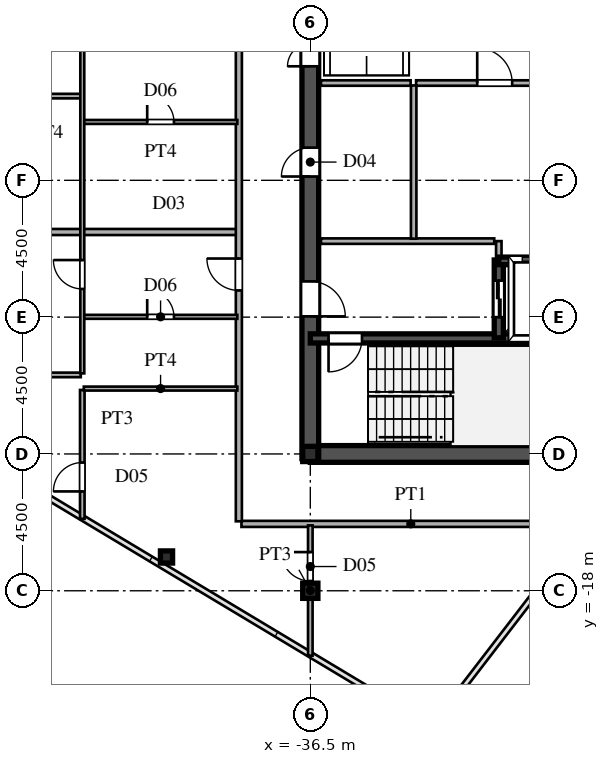
"""IFC4 building model, lengths in metres.
Left out: names, types, materials, properties, quantities, classifications, styles, units other than length and angle.
Written with IfcOpenShell. Run it as: python <this file> out.ifc"""

import sys

from ifc_helpers import new_model, si_unit, direction, frame, frame_2d, origin, origin_2d, place, context, subcontext, project, spatial, rectangle, hollow_rectangle, i_section, extrude, source, transform, mapped, element, fill, save


model = new_model("IFC4")
c1 = context("Model", 3, precision=1e-05, world=origin(), true_north=direction((0.0, 1.0)))
c2 = subcontext(c1, "Body", "Model", "MODEL_VIEW")
j1 = project(units=[si_unit("LENGTHUNIT", "METRE"), si_unit("PLANEANGLEUNIT", "RADIAN")], contexts=[c1])
p1 = place(None, origin())
s1 = spatial("IfcSite", under=j1, at=p1, CompositionType="ELEMENT")
p2 = place(p1, origin())
s2 = spatial("IfcBuilding", under=s1, at=p2, CompositionType="ELEMENT")
p3 = place(p2, frame((0.0, 0.0, 199.5)))
s3 = spatial("IfcBuildingStorey", under=s2, at=p3, CompositionType="ELEMENT", Elevation=199.5)
m1 = source(origin(), c2, "Body", "SweptSolid", [
    extrude(i_section(OverallWidth=0.5, OverallDepth=0.5, WebThickness=0.02, FlangeThickness=0.032, at=origin_2d()), origin(), (0.0, 0.0, 1.0), 3.6),
])
for number, where, z_axis, x_axis in (
    (1, (-36.5, -18.0, 0.0), (0.0, 0.0, 1.0), (1.0, 0.0, 0.0)),
    (2, (-36.5, -13.5, 0.0), (0.0, 0.0, 1.0), (1.0, 0.0, 0.0)),
):
    element("IfcColumn", number, at=place(p3, frame(where, z_axis=z_axis, x_axis=x_axis)), inside=s3, PredefinedType="COLUMN", context=c2, shape_type="MappedRepresentation", body=[
        mapped(m1, transform((0.0, 0.0, 0.0), scale=1.0)),
    ])
m2 = source(origin(), c2, "Body", "SweptSolid", [
    extrude(hollow_rectangle(XDim=0.4, YDim=0.4, WallThickness=0.016, at=origin_2d()), origin(), (0.0, 0.0, 1.0), 3.6),
])
p4 = place(p3, frame((-41.23, -16.889, 0.0), z_axis=(0.0, 0.0, 1.0), x_axis=(1.0, 0.0, 0.0)))
e3 = element("IfcColumn", 3, at=p4, inside=s3, PredefinedType="COLUMN", context=c2, shape_type="MappedRepresentation", body=[
    mapped(m2, transform((0.0, 0.0, 0.0), scale=1.0)),
])
p5 = place(p3, frame((-36.5, -13.5, 0.0), z_axis=(0.0, 0.0, 1.0), x_axis=(1.0, 0.0, 0.0)))
e4 = element("IfcWall", 4, at=p5, inside=s3, PredefinedType="SHEAR", context=c2, shape_type="SweptSolid", body=[
    extrude(rectangle(XDim=9.0, YDim=0.55, at=frame_2d((4.5, 0.0))), origin(), (0.0, 0.0, 1.0), 3.38),
])
p6 = place(p3, frame((-36.5, -13.65, 0.0), z_axis=(0.0, 0.0, 1.0), x_axis=(0.0, 1.0, 0.0)))
e5 = element("IfcWall", 5, at=p6, inside=s3, PredefinedType="SHEAR", context=c2, shape_type="SweptSolid", body=[
    extrude(rectangle(XDim=7.15, YDim=0.55, at=frame_2d((3.575, 0.0))), origin(), (0.0, 0.0, 1.0), 3.38),
])
p7 = place(p6, frame((4.675, 0.0, 0.0)))
e6 = element("IfcOpeningElement", 6, at=p7, cuts=e5, PredefinedType="OPENING", context=c2, shape_type="SweptSolid", body=[
    extrude(rectangle(XDim=1.15, YDim=2.2, at=frame_2d((0.575, 1.1))), frame((0.0, 0.285, 0.0), z_axis=(0.0, -1.0, 0.0), x_axis=(1.0, 0.0, 0.0)), (0.0, 0.0, 1.0), 0.57),
])
p8 = place(p3, frame((-36.5, -1.3, 0.0), z_axis=(0.0, 0.0, 1.0), x_axis=(0.0, 1.0, 0.0)))
e7 = element("IfcWall", 7, at=p8, inside=s3, PredefinedType="SHEAR", context=c2, shape_type="SweptSolid", body=[
    extrude(rectangle(XDim=2.6, YDim=0.55, at=frame_2d((1.3, 0.0))), origin(), (0.0, 0.0, 1.0), 3.38),
])
p9 = place(p8, frame((0.55, 0.0, 0.0)))
e8 = element("IfcOpeningElement", 8, at=p9, cuts=e7, PredefinedType="OPENING", context=c2, shape_type="SweptSolid", body=[
    extrude(rectangle(XDim=1.5, YDim=2.3, at=frame_2d((0.75, 1.15))), frame((0.0, 0.285, 0.0), z_axis=(0.0, -1.0, 0.0), x_axis=(1.0, 0.0, 0.0)), (0.0, 0.0, 1.0), 0.57),
])
p10 = place(p3, frame((-36.5, -6.5, 0.0), z_axis=(0.0, 0.0, 1.0), x_axis=(0.0, 1.0, 0.0)))
e9 = element("IfcWall", 9, at=p10, inside=s3, PredefinedType="SHEAR", context=c2, shape_type="SweptSolid", body=[
    extrude(rectangle(XDim=5.2, YDim=0.55, at=frame_2d((2.6, 0.0))), origin(), (0.0, 0.0, 1.0), 3.38),
])
p11 = place(p10, frame((2.125, 0.0, 0.0)))
e10 = element("IfcOpeningElement", 10, at=p11, cuts=e9, PredefinedType="OPENING", context=c2, shape_type="SweptSolid", body=[
    extrude(rectangle(XDim=0.95, YDim=2.15, at=frame_2d((0.475, 1.075))), frame((0.0, 0.285, 0.0), z_axis=(0.0, -1.0, 0.0), x_axis=(1.0, 0.0, 0.0)), (0.0, 0.0, 1.0), 0.57),
])
p12 = place(p3, frame((-36.5, -9.7, 0.0), z_axis=(0.0, 0.0, 1.0), x_axis=(1.0, 0.0, 0.0)))
e11 = element("IfcWall", 11, at=p12, inside=s3, PredefinedType="SHEAR", context=c2, shape_type="SweptSolid", body=[
    extrude(rectangle(XDim=9.0, YDim=0.3, at=frame_2d((4.5, 0.0))), origin(), (0.0, 0.0, 1.0), 3.38),
])
p13 = place(p12, frame((0.6, 0.0, 0.0)))
e12 = element("IfcOpeningElement", 12, at=p13, cuts=e11, PredefinedType="OPENING", context=c2, shape_type="SweptSolid", body=[
    extrude(rectangle(XDim=1.1, YDim=2.2, at=frame_2d((0.55, 1.1))), frame((0.0, 0.16, 0.0), z_axis=(0.0, -1.0, 0.0), x_axis=(1.0, 0.0, 0.0)), (0.0, 0.0, 1.0), 0.32),
])
p14 = place(p3, frame((-30.3, -7.15, 0.0), z_axis=(0.0, 0.0, 1.0), x_axis=(1.0, 0.0, 0.0)))
e13 = element("IfcWall", 13, at=p14, inside=s3, PredefinedType="SHEAR", context=c2, shape_type="SweptSolid", body=[
    extrude(rectangle(XDim=2.8, YDim=0.25, at=frame_2d((1.4, 0.0))), origin(), (0.0, 0.0, 1.0), 3.38),
])
p15 = place(p3, frame((-30.3, -9.68, 0.0), z_axis=(0.0, 0.0, 1.0), x_axis=(0.0, 1.0, 0.0)))
e14 = element("IfcWall", 14, at=p15, inside=s3, PredefinedType="SHEAR", context=c2, shape_type="SweptSolid", body=[
    extrude(rectangle(XDim=2.56, YDim=0.3, at=frame_2d((1.28, 0.0))), origin(), (0.0, 0.0, 1.0), 3.38),
])
p16 = place(p15, frame((0.68, 0.0, 0.0)))
e15 = element("IfcOpeningElement", 15, at=p16, cuts=e14, PredefinedType="OPENING", context=c2, shape_type="SweptSolid", body=[
    extrude(rectangle(XDim=1.2, YDim=2.25, at=frame_2d((0.6, 1.125))), frame((0.0, 0.16, 0.0), z_axis=(0.0, -1.0, 0.0), x_axis=(1.0, 0.0, 0.0)), (0.0, 0.0, 1.0), 0.32),
])
p17 = place(p3, frame((-36.15, -6.5, 0.0), z_axis=(0.0, 0.0, 1.0), x_axis=(1.0, 0.0, 0.0)))
e16 = element("IfcWall", 16, at=p17, inside=s3, PredefinedType="PARTITIONING", context=c2, shape_type="SweptSolid", body=[
    extrude(rectangle(XDim=5.7, YDim=0.18, at=frame_2d((2.85, 0.0))), origin(), (0.0, 0.0, 1.0), 3.38),
])
p18 = place(p3, frame((-30.3, -7.12, 0.0), z_axis=(0.0, 0.0, 1.0), x_axis=(0.0, 1.0, 0.0)))
e17 = element("IfcWall", 17, at=p18, inside=s3, PredefinedType="PARTITIONING", context=c2, shape_type="SweptSolid", body=[
    extrude(rectangle(XDim=0.62, YDim=0.18, at=frame_2d((0.31, 0.0))), origin(), (0.0, 0.0, 1.0), 3.38),
])
p19 = place(p3, frame((-33.1, -6.42, 0.0), z_axis=(0.0, 0.0, 1.0), x_axis=(0.0, 1.0, 0.0)))
e18 = element("IfcWall", 18, at=p19, inside=s3, PredefinedType="PARTITIONING", context=c2, shape_type="SweptSolid", body=[
    extrude(rectangle(XDim=5.04, YDim=0.18, at=frame_2d((2.52, 0.0))), origin(), (0.0, 0.0, 1.0), 3.38),
])
p20 = place(p3, frame((-33.02, -1.3, 0.0), z_axis=(0.0, 0.0, 1.0), x_axis=(1.0, 0.0, 0.0)))
e19 = element("IfcWall", 19, at=p20, inside=s3, PredefinedType="PARTITIONING", context=c2, shape_type="SweptSolid", body=[
    extrude(rectangle(XDim=5.17, YDim=0.18, at=frame_2d((2.585, 0.0))), origin(), (0.0, 0.0, 1.0), 3.38),
])
p21 = place(p20, frame((2.01, 0.0, 0.0)))
e20 = element("IfcOpeningElement", 20, at=p21, cuts=e19, PredefinedType="OPENING", context=c2, shape_type="SweptSolid", body=[
    extrude(rectangle(XDim=1.15, YDim=2.2, at=frame_2d((0.575, 1.1))), frame((0.0, 0.1, 0.0), z_axis=(0.0, -1.0, 0.0), x_axis=(1.0, 0.0, 0.0)), (0.0, 0.0, 1.0), 0.2),
])
p22 = place(p3, frame((-36.15, -1.3, 0.0), z_axis=(0.0, 0.0, 1.0), x_axis=(1.0, 0.0, 0.0)))
e21 = element("IfcWall", 21, at=p22, inside=s3, PredefinedType="PARTITIONING", context=c2, shape_type="SweptSolid", body=[
    extrude(rectangle(XDim=2.95, YDim=0.18, at=frame_2d((1.475, 0.0))), origin(), (0.0, 0.0, 1.0), 3.38),
])
p23 = place(p3, frame((-38.765, -15.8, 0.0), z_axis=(0.0, 0.0, 1.0), x_axis=(1.0, 0.0, 0.0)))
e22 = element("IfcWall", 22, at=p23, inside=s3, PredefinedType="PARTITIONING", context=c2, shape_type="SweptSolid", body=[
    extrude(rectangle(XDim=11.14, YDim=0.2, at=frame_2d((5.57, 0.0))), origin(), (0.0, 0.0, 1.0), 3.38),
])
p24 = place(p3, frame((-43.95, -11.35, 0.0), z_axis=(0.0, 0.0, 1.0), x_axis=(1.0, 0.0, 0.0)))
e23 = element("IfcWall", 23, at=p24, inside=s3, PredefinedType="PARTITIONING", context=c2, shape_type="SweptSolid", body=[
    extrude(rectangle(XDim=5.05, YDim=0.13, at=frame_2d((2.525, 0.0))), origin(), (0.0, 0.0, 1.0), 3.38),
])
p25 = place(p3, frame((-51.868, -10.9, 0.0), z_axis=(0.0, 0.0, 1.0), x_axis=(1.0, 0.0, 0.0)))
e24 = element("IfcWall", 24, at=p25, inside=s3, PredefinedType="PARTITIONING", context=c2, shape_type="SweptSolid", body=[
    extrude(rectangle(XDim=7.818, YDim=0.15, at=frame_2d((3.909, 0.0))), origin(), (0.0, 0.0, 1.0), 3.38),
])
p26 = place(p25, frame((3.476, 0.0, 0.0)))
e25 = element("IfcOpeningElement", 25, at=p26, cuts=e24, PredefinedType="OPENING", context=c2, shape_type="SweptSolid", body=[
    extrude(rectangle(XDim=0.95, YDim=2.15, at=frame_2d((0.475, 1.075))), frame((0.0, 0.085, 0.0), z_axis=(0.0, -1.0, 0.0), x_axis=(1.0, 0.0, 0.0)), (0.0, 0.0, 1.0), 0.17),
])
p27 = place(p3, frame((-43.95, -8.99, 0.0), z_axis=(0.0, 0.0, 1.0), x_axis=(1.0, 0.0, 0.0)))
e26 = element("IfcWall", 26, at=p27, inside=s3, PredefinedType="PARTITIONING", context=c2, shape_type="SweptSolid", body=[
    extrude(rectangle(XDim=5.05, YDim=0.13, at=frame_2d((2.525, 0.0))), origin(), (0.0, 0.0, 1.0), 3.38),
])
p28 = place(p27, frame((2.085, 0.0, 0.0)))
e27 = element("IfcOpeningElement", 27, at=p28, cuts=e26, PredefinedType="OPENING", context=c2, shape_type="SweptSolid", body=[
    extrude(rectangle(XDim=0.88, YDim=2.1, at=frame_2d((0.44, 1.05))), frame((0.0, 0.075, 0.0), z_axis=(0.0, -1.0, 0.0), x_axis=(1.0, 0.0, 0.0)), (0.0, 0.0, 1.0), 0.15),
])
p29 = place(p3, frame((-59.676, -6.2, 0.0), z_axis=(0.0, 0.0, 1.0), x_axis=(1.0, 0.0, 0.0)))
e28 = element("IfcWall", 28, at=p29, inside=s3, PredefinedType="PARTITIONING", context=c2, shape_type="SweptSolid", body=[
    extrude(rectangle(XDim=20.746, YDim=0.2, at=frame_2d((10.373, 0.0))), origin(), (0.0, 0.0, 1.0), 3.38),
])
p30 = place(p3, frame((-43.95, -2.58, 0.0), z_axis=(0.0, 0.0, 1.0), x_axis=(1.0, 0.0, 0.0)))
e29 = element("IfcWall", 29, at=p30, inside=s3, PredefinedType="PARTITIONING", context=c2, shape_type="SweptSolid", body=[
    extrude(rectangle(XDim=5.05, YDim=0.13, at=frame_2d((2.525, 0.0))), origin(), (0.0, 0.0, 1.0), 3.38),
])
p31 = place(p30, frame((2.085, 0.0, 0.0)))
e30 = element("IfcOpeningElement", 30, at=p31, cuts=e29, PredefinedType="OPENING", context=c2, shape_type="SweptSolid", body=[
    extrude(rectangle(XDim=0.88, YDim=2.1, at=frame_2d((0.44, 1.05))), frame((0.0, 0.075, 0.0), z_axis=(0.0, -1.0, 0.0), x_axis=(1.0, 0.0, 0.0)), (0.0, 0.0, 1.0), 0.15),
])
p32 = place(p3, frame((-66.874, -1.73, 0.0), z_axis=(0.0, 0.0, 1.0), x_axis=(1.0, 0.0, 0.0)))
e31 = element("IfcWall", 31, at=p32, inside=s3, PredefinedType="PARTITIONING", context=c2, shape_type="SweptSolid", body=[
    extrude(rectangle(XDim=22.824, YDim=0.15, at=frame_2d((11.412, 0.0))), origin(), (0.0, 0.0, 1.0), 3.38),
])
p33 = place(p32, frame((17.149, 0.0, 0.0)))
e32 = element("IfcOpeningElement", 32, at=p33, cuts=e31, PredefinedType="OPENING", context=c2, shape_type="SweptSolid", body=[
    extrude(rectangle(XDim=0.95, YDim=2.15, at=frame_2d((0.475, 1.075))), frame((0.0, 0.085, 0.0), z_axis=(0.0, -1.0, 0.0), x_axis=(1.0, 0.0, 0.0)), (0.0, 0.0, 1.0), 0.17),
])
p34 = place(p32, frame((9.049, 0.0, 0.0)))
e33 = element("IfcOpeningElement", 33, at=p34, cuts=e31, PredefinedType="OPENING", context=c2, shape_type="SweptSolid", body=[
    extrude(rectangle(XDim=0.95, YDim=2.15, at=frame_2d((0.475, 1.075))), frame((0.0, 0.085, 0.0), z_axis=(0.0, -1.0, 0.0), x_axis=(1.0, 0.0, 0.0)), (0.0, 0.0, 1.0), 0.17),
])
p35 = place(p3, frame((-44.0, -15.635, 0.0), z_axis=(0.0, 0.0, 1.0), x_axis=(0.0, 1.0, 0.0)))
e34 = element("IfcWall", 34, at=p35, inside=s3, PredefinedType="PARTITIONING", context=c2, shape_type="SweptSolid", body=[
    extrude(rectangle(XDim=4.24, YDim=0.15, at=frame_2d((2.12, 0.0))), origin(), (0.0, 0.0, 1.0), 3.38),
])
p36 = place(p35, frame((0.903, 0.0, 0.0)))
e35 = element("IfcOpeningElement", 35, at=p36, cuts=e34, PredefinedType="OPENING", context=c2, shape_type="SweptSolid", body=[
    extrude(rectangle(XDim=0.95, YDim=2.15, at=frame_2d((0.475, 1.075))), frame((0.0, 0.085, 0.0), z_axis=(0.0, -1.0, 0.0), x_axis=(1.0, 0.0, 0.0)), (0.0, 0.0, 1.0), 0.17),
])
p37 = place(p3, frame((-44.0, -10.85, 0.0), z_axis=(0.0, 0.0, 1.0), x_axis=(0.0, 1.0, 0.0)))
e36 = element("IfcWall", 36, at=p37, inside=s3, PredefinedType="PARTITIONING", context=c2, shape_type="SweptSolid", body=[
    extrude(rectangle(XDim=13.533, YDim=0.13, at=frame_2d((6.767, 0.0))), origin(), (0.0, 0.0, 1.0), 3.38),
])
p38 = place(p37, frame((2.778, 0.0, 0.0)))
e37 = element("IfcOpeningElement", 37, at=p38, cuts=e36, PredefinedType="OPENING", context=c2, shape_type="SweptSolid", body=[
    extrude(rectangle(XDim=0.95, YDim=2.15, at=frame_2d((0.475, 1.075))), frame((0.0, 0.075, 0.0), z_axis=(0.0, -1.0, 0.0), x_axis=(1.0, 0.0, 0.0)), (0.0, 0.0, 1.0), 0.15),
])
p39 = place(p37, frame((10.875, 0.0, 0.0)))
e38 = element("IfcOpeningElement", 38, at=p39, cuts=e36, PredefinedType="OPENING", context=c2, shape_type="SweptSolid", body=[
    extrude(rectangle(XDim=0.95, YDim=2.15, at=frame_2d((0.475, 1.075))), frame((0.0, 0.075, 0.0), z_axis=(0.0, -1.0, 0.0), x_axis=(1.0, 0.0, 0.0)), (0.0, 0.0, 1.0), 0.15),
])
p40 = place(p3, frame((-38.85, -15.715, 0.0), z_axis=(0.0, 0.0, 1.0), x_axis=(0.0, 1.0, 0.0)))
e39 = element("IfcWall", 39, at=p40, inside=s3, PredefinedType="PARTITIONING", context=c2, shape_type="SweptSolid", body=[
    extrude(rectangle(XDim=31.43, YDim=0.2, at=frame_2d((15.715, 0.0))), origin(), (0.0, 0.0, 1.0), 3.38),
])
p41 = place(p40, frame((7.593, 0.0, 0.0)))
e40 = element("IfcOpeningElement", 40, at=p41, cuts=e39, PredefinedType="OPENING", context=c2, shape_type="SweptSolid", body=[
    extrude(rectangle(XDim=1.05, YDim=2.25, at=frame_2d((0.525, 1.125))), frame((0.0, 0.11, 0.0), z_axis=(0.0, -1.0, 0.0), x_axis=(1.0, 0.0, 0.0)), (0.0, 0.0, 1.0), 0.22),
])
p42 = place(p40, frame((15.489, 0.0, 0.0)))
e41 = element("IfcOpeningElement", 41, at=p42, cuts=e39, PredefinedType="OPENING", context=c2, shape_type="SweptSolid", body=[
    extrude(rectangle(XDim=1.05, YDim=2.25, at=frame_2d((0.525, 1.125))), frame((0.0, 0.11, 0.0), z_axis=(0.0, -1.0, 0.0), x_axis=(1.0, 0.0, 0.0)), (0.0, 0.0, 1.0), 0.22),
])
p43 = place(p40, frame((26.69, 0.0, 0.0)))
e42 = element("IfcOpeningElement", 42, at=p43, cuts=e39, PredefinedType="OPENING", context=c2, shape_type="SweptSolid", body=[
    extrude(rectangle(XDim=1.05, YDim=2.25, at=frame_2d((0.525, 1.125))), frame((0.0, 0.11, 0.0), z_axis=(0.0, -1.0, 0.0), x_axis=(1.0, 0.0, 0.0)), (0.0, 0.0, 1.0), 0.22),
])
p44 = place(p3, frame((-36.5, -20.135, 0.0), z_axis=(0.0, 0.0, 1.0), x_axis=(0.0, 1.0, 0.0)))
e43 = element("IfcWall", 43, at=p44, inside=s3, PredefinedType="PARTITIONING", context=c2, shape_type="SweptSolid", body=[
    extrude(rectangle(XDim=4.285, YDim=0.15, at=frame_2d((2.143, 0.0))), origin(), (0.0, 0.0, 1.0), 2.78),
])
p45 = place(p44, frame((2.457, 0.0, 0.0)))
e44 = element("IfcOpeningElement", 44, at=p45, cuts=e43, PredefinedType="OPENING", context=c2, shape_type="SweptSolid", body=[
    extrude(rectangle(XDim=0.95, YDim=2.15, at=frame_2d((0.475, 1.075))), frame((0.0, 0.085, 0.0), z_axis=(0.0, -1.0, 0.0), x_axis=(1.0, 0.0, 0.0)), (0.0, 0.0, 1.0), 0.17),
])
m3 = source(origin(), c2, "Body", "SweptSolid", [
    extrude(rectangle(XDim=1.15, YDim=2.2, at=frame_2d((0.575, 1.1))), frame((0.0, 0.025, 0.0), z_axis=(0.0, -1.0, 0.0), x_axis=(1.0, 0.0, 0.0)), (0.0, 0.0, 1.0), 0.05),
])
p46 = place(p7, frame((1.15, 0.0, 0.0), z_axis=(0.0, 0.0, 1.0), x_axis=(-1.0, 0.0, 0.0)))
e45 = element("IfcDoor", 45, at=p46, inside=s3, OperationType="SINGLE_SWING_LEFT", PredefinedType="DOOR", context=c2, shape_type="MappedRepresentation", body=[
    mapped(m3, transform((0.0, 0.0, 0.0), scale=1.0)),
])
fill(e6, e45)
m4 = source(origin(), c2, "Body", "SweptSolid", [
    extrude(rectangle(XDim=1.5, YDim=2.3, at=frame_2d((0.75, 1.15))), frame((0.0, 0.025, 0.0), z_axis=(0.0, -1.0, 0.0), x_axis=(1.0, 0.0, 0.0)), (0.0, 0.0, 1.0), 0.05),
])
p47 = place(p9, origin())
e46 = element("IfcDoor", 46, at=p47, inside=s3, OperationType="DOUBLE_SWING_LEFT", PredefinedType="DOOR", context=c2, shape_type="MappedRepresentation", body=[
    mapped(m4, transform((0.0, 0.0, 0.0), scale=1.0)),
])
fill(e8, e46)
m5 = source(origin(), c2, "Body", "SweptSolid", [
    extrude(rectangle(XDim=0.95, YDim=2.15, at=frame_2d((0.475, 1.075))), frame((0.0, 0.025, 0.0), z_axis=(0.0, -1.0, 0.0), x_axis=(1.0, 0.0, 0.0)), (0.0, 0.0, 1.0), 0.05),
])
p48 = place(p11, origin())
e47 = element("IfcDoor", 47, at=p48, inside=s3, OperationType="SINGLE_SWING_LEFT", PredefinedType="DOOR", context=c2, shape_type="MappedRepresentation", body=[
    mapped(m5, transform((0.0, 0.0, 0.0), scale=1.0)),
])
fill(e10, e47)
m6 = source(origin(), c2, "Body", "SweptSolid", [
    extrude(rectangle(XDim=1.1, YDim=2.2, at=frame_2d((0.55, 1.1))), frame((0.0, 0.025, 0.0), z_axis=(0.0, -1.0, 0.0), x_axis=(1.0, 0.0, 0.0)), (0.0, 0.0, 1.0), 0.05),
])
p49 = place(p13, frame((1.1, 0.0, 0.0), z_axis=(0.0, 0.0, 1.0), x_axis=(-1.0, 0.0, 0.0)))
e48 = element("IfcDoor", 48, at=p49, inside=s3, OperationType="SINGLE_SWING_LEFT", PredefinedType="DOOR", context=c2, shape_type="MappedRepresentation", body=[
    mapped(m6, transform((0.0, 0.0, 0.0), scale=1.0)),
])
fill(e12, e48)
m7 = source(origin(), c2, "Body", "SweptSolid", [
    extrude(rectangle(XDim=1.2, YDim=2.25, at=frame_2d((0.6, 1.125))), frame((0.0, 0.025, 0.0), z_axis=(0.0, -1.0, 0.0), x_axis=(1.0, 0.0, 0.0)), (0.0, 0.0, 1.0), 0.05),
])
p50 = place(p16, origin())
e49 = element("IfcDoor", 49, at=p50, inside=s3, OperationType="DOUBLE_DOOR_SLIDING", PredefinedType="DOOR", context=c2, shape_type="MappedRepresentation", body=[
    mapped(m7, transform((0.0, 0.0, 0.0), scale=1.0)),
])
fill(e15, e49)
p51 = place(p21, origin())
e50 = element("IfcDoor", 50, at=p51, inside=s3, OperationType="SINGLE_SWING_LEFT", PredefinedType="DOOR", context=c2, shape_type="MappedRepresentation", body=[
    mapped(m3, transform((0.0, 0.0, 0.0), scale=1.0)),
])
fill(e20, e50)
m8 = source(origin(), c2, "Body", "SweptSolid", [
    extrude(rectangle(XDim=0.88, YDim=2.1, at=frame_2d((0.44, 1.05))), frame((0.0, 0.025, 0.0), z_axis=(0.0, -1.0, 0.0), x_axis=(1.0, 0.0, 0.0)), (0.0, 0.0, 1.0), 0.05),
])
p52 = place(p28, origin())
e51 = element("IfcDoor", 51, at=p52, inside=s3, OperationType="SINGLE_SWING_LEFT", PredefinedType="DOOR", context=c2, shape_type="MappedRepresentation", body=[
    mapped(m8, transform((0.0, 0.0, 0.0), scale=1.0)),
])
fill(e27, e51)
p53 = place(p31, origin())
e52 = element("IfcDoor", 52, at=p53, inside=s3, OperationType="SINGLE_SWING_LEFT", PredefinedType="DOOR", context=c2, shape_type="MappedRepresentation", body=[
    mapped(m8, transform((0.0, 0.0, 0.0), scale=1.0)),
])
fill(e30, e52)
m9 = source(origin(), c2, "Body", "SweptSolid", [
    extrude(rectangle(XDim=0.95, YDim=2.15, at=frame_2d((0.475, 1.075))), frame((0.0, 0.025, 0.0), z_axis=(0.0, -1.0, 0.0), x_axis=(1.0, 0.0, 0.0)), (0.0, 0.0, 1.0), 0.05),
])
p54 = place(p36, origin())
e53 = element("IfcDoor", 53, at=p54, inside=s3, OperationType="SINGLE_SWING_LEFT", PredefinedType="DOOR", context=c2, shape_type="MappedRepresentation", body=[
    mapped(m9, transform((0.0, 0.0, 0.0), scale=1.0)),
])
fill(e35, e53)
p55 = place(p38, origin())
e54 = element("IfcDoor", 54, at=p55, inside=s3, OperationType="SINGLE_SWING_RIGHT", PredefinedType="DOOR", context=c2, shape_type="MappedRepresentation", body=[
    mapped(m9, transform((0.0, 0.0, 0.0), scale=1.0)),
])
fill(e37, e54)
m10 = source(origin(), c2, "Body", "SweptSolid", [
    extrude(rectangle(XDim=1.05, YDim=2.25, at=frame_2d((0.525, 1.125))), frame((0.0, 0.025, 0.0), z_axis=(0.0, -1.0, 0.0), x_axis=(1.0, 0.0, 0.0)), (0.0, 0.0, 1.0), 0.05),
])
p56 = place(p41, origin())
e55 = element("IfcDoor", 55, at=p56, inside=s3, OperationType="SINGLE_SWING_RIGHT", PredefinedType="DOOR", context=c2, shape_type="MappedRepresentation", body=[
    mapped(m10, transform((0.0, 0.0, 0.0), scale=1.0)),
])
fill(e40, e55)
p57 = place(p45, origin())
e56 = element("IfcDoor", 56, at=p57, inside=s3, OperationType="SINGLE_SWING_RIGHT", PredefinedType="DOOR", context=c2, shape_type="MappedRepresentation", body=[
    mapped(m9, transform((0.0, 0.0, 0.0), scale=1.0)),
])
fill(e44, e56)
save(model, sys.argv[1])
